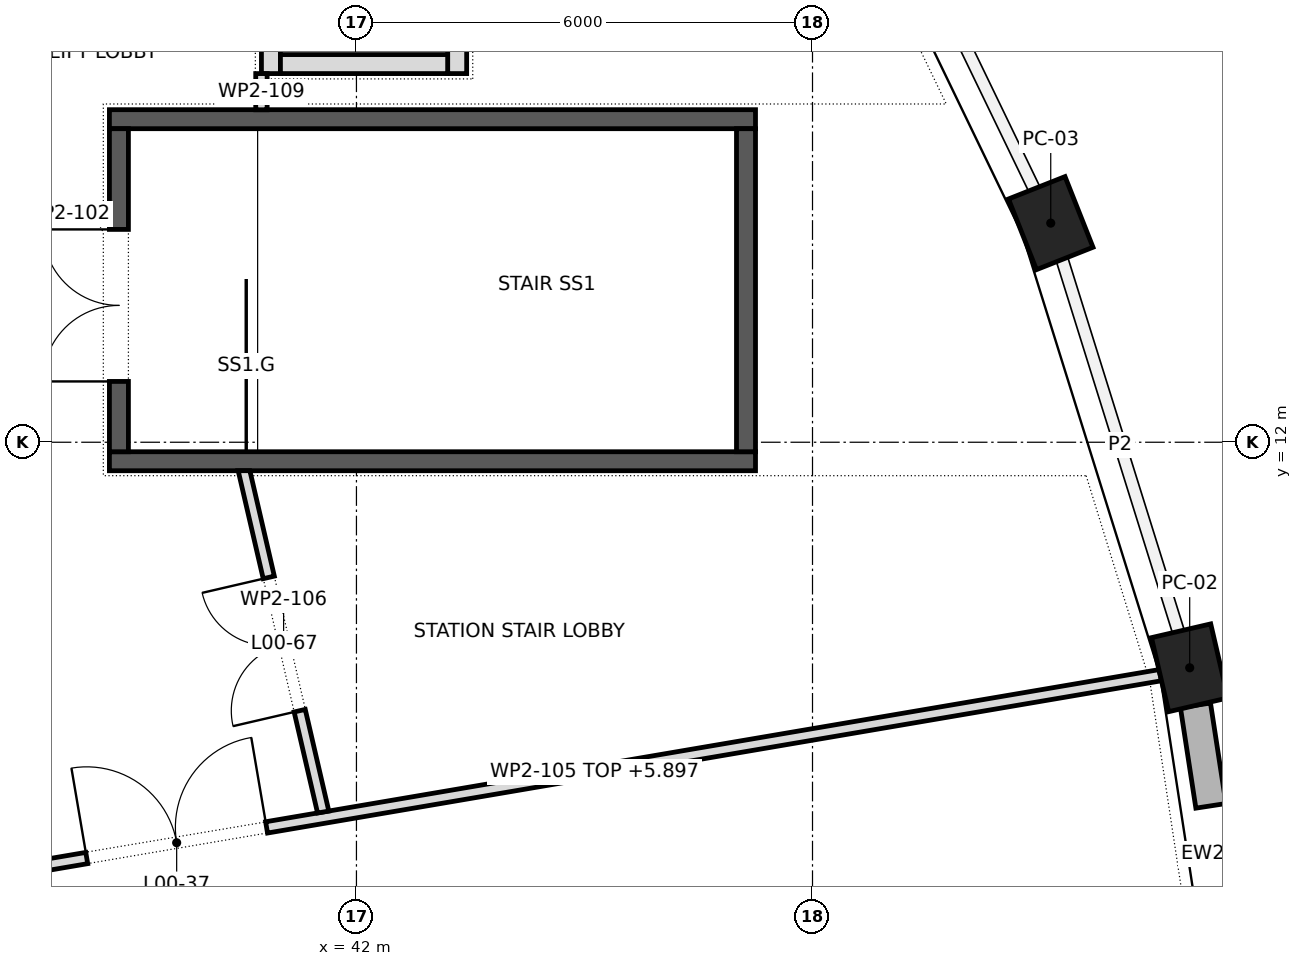
"""IFC4 building model, lengths in metres.
Left out: names, types, materials, properties, quantities, classifications, styles, units other than length and angle.
Written with IfcOpenShell. Run it as: python <this file> out.ifc"""

import sys

from ifc_helpers import new_model, si_unit, direction, frame, frame_2d, origin, origin_2d, place, context, subcontext, project, spatial, polyline, rectangle, outline, extrude, element, fill, save


model = new_model("IFC4")
c1 = context("Model", 3, precision=1e-05, world=origin(), true_north=direction((0.0, 1.0)))
c2 = subcontext(c1, "Body", "Model", "MODEL_VIEW")
j1 = project(units=[si_unit("LENGTHUNIT", "METRE"), si_unit("PLANEANGLEUNIT", "RADIAN")], contexts=[c1])
p1 = place(None, origin())
s1 = spatial("IfcSite", under=j1, at=p1, CompositionType="ELEMENT")
p2 = place(p1, origin())
s2 = spatial("IfcBuilding", under=s1, at=p2, CompositionType="ELEMENT")
p3 = place(p2, origin())
s3 = spatial("IfcBuildingStorey", under=s2, at=p3, CompositionType="ELEMENT", Elevation=0.0)
for number, where, z_axis, x_axis in (
    (1, (52.962, 9.033, 0.0), (0.0, 0.0, 1.0), (-0.226, 0.974, 0.0)),
    (2, (51.134, 14.883, 0.0), (0.0, 0.0, 1.0), (-0.368, 0.93, 0.0)),
):
    element("IfcColumn", number, at=place(p3, frame(where, z_axis=z_axis, x_axis=x_axis)), inside=s3, PredefinedType="COLUMN", context=c2, shape_type="SweptSolid", body=[
        extrude(rectangle(XDim=1.0, YDim=0.8, at=origin_2d()), origin(), (0.0, 0.0, 1.0), 7.0),
    ])
p4 = place(p3, frame((38.032, 2.267, 0.0), z_axis=(0.0, 0.0, 1.0), x_axis=(-0.226058185805, 0.974113800657, 0.0)))
e3 = element("IfcWall", 3, at=p4, inside=s3, PredefinedType="SHEAR", context=c2, shape_type="SweptSolid", body=[
    extrude(rectangle(XDim=8.329, YDim=1.2, at=frame_2d((4.165, 0.0))), origin(), (0.0, 0.0, 1.0), 7.0),
])
p5 = place(p3, frame((53.809, 3.522, 0.0), z_axis=(0.0, 0.0, 1.0), x_axis=(-0.151778822734, 0.988414482375, 0.0)))
e4 = element("IfcWall", 4, at=p5, inside=s3, PredefinedType="STANDARD", context=c2, shape_type="SweptSolid", body=[
    extrude(rectangle(XDim=5.075, YDim=0.4, at=frame_2d((2.538, 0.0))), origin(), (0.0, 0.0, 1.0), 6.2),
])
p6 = place(p5, frame((1.337, 0.0, 0.0)))
e5 = element("IfcOpeningElement", 5, at=p6, cuts=e4, PredefinedType="OPENING", context=c2, shape_type="SweptSolid", body=[
    extrude(rectangle(XDim=2.4, YDim=2.4, at=frame_2d((1.2, 1.2))), frame((0.0, 0.212, 0.0), z_axis=(0.0, -1.0, 0.0), x_axis=(1.0, 0.0, 0.0)), (0.0, 0.0, 1.0), 0.424),
])
for number, where, z_axis, x_axis in (
    (6, (38.75, 16.25, 0.0), (0.0, 0.0, 1.0), (1.0, 0.0, 0.0)),
    (7, (38.75, 11.75, 0.0), (0.0, 0.0, 1.0), (1.0, 0.0, 0.0)),
):
    element("IfcWall", number, at=place(p3, frame(where, z_axis=z_axis, x_axis=x_axis)), inside=s3, PredefinedType="SHEAR", context=c2, shape_type="SweptSolid", body=[
        extrude(rectangle(XDim=8.5, YDim=0.25, at=frame_2d((4.25, 0.0))), origin(), (0.0, 0.0, 1.0), 6.65),
    ])
p7 = place(p3, frame((38.875, 11.875, 0.0), z_axis=(0.0, 0.0, 1.0), x_axis=(0.0, 1.0, 0.0)))
e8 = element("IfcWall", 8, at=p7, inside=s3, PredefinedType="SHEAR", context=c2, shape_type="SweptSolid", body=[
    extrude(rectangle(XDim=4.25, YDim=0.25, at=frame_2d((2.125, 0.0))), origin(), (0.0, 0.0, 1.0), 6.65),
])
p8 = place(p7, frame((0.925, 0.0, 0.0)))
e9 = element("IfcOpeningElement", 9, at=p8, cuts=e8, PredefinedType="OPENING", context=c2, shape_type="SweptSolid", body=[
    extrude(rectangle(XDim=2.0, YDim=2.1, at=frame_2d((1.0, 1.05))), frame((0.0, 0.137, 0.0), z_axis=(0.0, -1.0, 0.0), x_axis=(1.0, 0.0, 0.0)), (0.0, 0.0, 1.0), 0.274),
])
p9 = place(p3, frame((47.125, 11.875, 0.0), z_axis=(0.0, 0.0, 1.0), x_axis=(0.0, 1.0, 0.0)))
e10 = element("IfcWall", 10, at=p9, inside=s3, PredefinedType="SHEAR", context=c2, shape_type="SweptSolid", body=[
    extrude(rectangle(XDim=4.25, YDim=0.25, at=frame_2d((2.125, 0.0))), origin(), (0.0, 0.0, 1.0), 6.65),
])
p10 = place(p3, frame((40.875, 16.85, 0.0), z_axis=(0.0, 0.0, 1.0), x_axis=(0.0, 1.0, 0.0)))
e11 = element("IfcWall", 11, at=p10, inside=s3, PredefinedType="PARTITIONING", context=c2, shape_type="SweptSolid", body=[
    extrude(rectangle(XDim=2.3, YDim=0.25, at=frame_2d((1.15, 0.0))), origin(), (0.0, 0.0, 1.0), 6.65),
])
p11 = place(p10, frame((0.6, 0.0, 0.0)))
e12 = element("IfcOpeningElement", 12, at=p11, cuts=e11, PredefinedType="OPENING", context=c2, shape_type="SweptSolid", body=[
    extrude(rectangle(XDim=1.1, YDim=2.1, at=frame_2d((0.55, 1.05))), frame((0.0, 0.137, 0.0), z_axis=(0.0, -1.0, 0.0), x_axis=(1.0, 0.0, 0.0)), (0.0, 0.0, 1.0), 0.274),
])
p12 = place(p3, frame((43.325, 16.85, 0.0), z_axis=(0.0, 0.0, 1.0), x_axis=(0.0, 1.0, 0.0)))
e13 = element("IfcWall", 13, at=p12, inside=s3, PredefinedType="PARTITIONING", context=c2, shape_type="SweptSolid", body=[
    extrude(rectangle(XDim=2.3, YDim=0.25, at=frame_2d((1.15, 0.0))), origin(), (0.0, 0.0, 1.0), 6.65),
])
p13 = place(p3, frame((41.0, 16.975, 0.0), z_axis=(0.0, 0.0, 1.0), x_axis=(1.0, 0.0, 0.0)))
e14 = element("IfcWall", 14, at=p13, inside=s3, PredefinedType="PARTITIONING", context=c2, shape_type="SweptSolid", body=[
    extrude(rectangle(XDim=2.2, YDim=0.25, at=frame_2d((1.1, 0.0))), origin(), (0.0, 0.0, 1.0), 6.65),
])
p14 = place(p3, frame((37.625, 15.0, 0.0), z_axis=(0.0, 0.0, 1.0), x_axis=(1.0, 0.0, 0.0)))
e15 = element("IfcWall", 15, at=p14, inside=s3, PredefinedType="PARTITIONING", context=c2, shape_type="SweptSolid", body=[
    extrude(rectangle(XDim=1.126, YDim=0.15, at=frame_2d((0.563, 0.0))), origin(), (0.0, 0.0, 1.0), 6.65),
])
p15 = place(p3, frame((37.688, 6.4, 0.0), z_axis=(0.0, 0.0, 1.0), x_axis=(0.985802614267, 0.167908325299, 0.0)))
e16 = element("IfcWall", 16, at=p15, inside=s3, PredefinedType="PARTITIONING", context=c2, shape_type="SweptSolid", body=[
    extrude(outline(polyline([(0.004, -0.075), (15.106, -0.075), (15.097, 0.075), (-0.004, 0.075), (0.004, -0.075)])), origin(), (0.0, 0.0, 1.0), 5.897),
])
p16 = place(p15, frame((0.775, 0.0, 0.0)))
e17 = element("IfcOpeningElement", 17, at=p16, cuts=e16, PredefinedType="OPENING", context=c2, shape_type="SweptSolid", body=[
    extrude(rectangle(XDim=2.4, YDim=2.1, at=frame_2d((1.2, 1.05))), frame((0.0, 0.087, 0.0), z_axis=(0.0, -1.0, 0.0), x_axis=(1.0, 0.0, 0.0)), (0.0, 0.0, 1.0), 0.174),
])
p17 = place(p3, frame((40.521, 11.625, 0.0), z_axis=(0.0, 0.0, 1.0), x_axis=(0.225938556647, -0.974141554714, 0.0)))
e18 = element("IfcWall", 18, at=p17, inside=s3, PredefinedType="PARTITIONING", context=c2, shape_type="SweptSolid", body=[
    extrude(outline(polyline([(-0.017, -0.075), (4.605, -0.075), (4.614, 0.075), (0.017, 0.075), (-0.017, -0.075)])), origin(), (0.0, 0.0, 1.0), 6.65),
])
p18 = place(p17, frame((1.441, 0.0, 0.0)))
e19 = element("IfcOpeningElement", 19, at=p18, cuts=e18, PredefinedType="OPENING", context=c2, shape_type="SweptSolid", body=[
    extrude(rectangle(XDim=1.8, YDim=2.1, at=frame_2d((0.9, 1.05))), frame((0.0, 0.087, 0.0), z_axis=(0.0, -1.0, 0.0), x_axis=(1.0, 0.0, 0.0)), (0.0, 0.0, 1.0), 0.174),
])
p19 = place(p3, frame((40.75, 16.85, 0.0), z_axis=(0.0, 0.0, 1.0), x_axis=(0.0, -1.0, 0.0)))
e20 = element("IfcWall", 20, at=p19, inside=s3, PredefinedType="PARTITIONING", context=c2, shape_type="SweptSolid", body=[
    extrude(rectangle(XDim=0.476, YDim=0.15, at=frame_2d((0.238, 0.0))), origin(), (0.0, 0.0, 1.0), 6.65),
])
p20 = place(p6, frame((2.4, 0.0, 0.0), z_axis=(0.0, 0.0, 1.0), x_axis=(-1.0, 0.0, 0.0)))
e21 = element("IfcDoor", 21, at=p20, inside=s3, OperationType="DOUBLE_DOOR_SINGLE_SWING", PredefinedType="DOOR", context=c2, shape_type="SweptSolid", body=[
    extrude(rectangle(XDim=2.4, YDim=2.4, at=frame_2d((1.2, 1.2))), frame((0.0, 0.025, 0.0), z_axis=(0.0, -1.0, 0.0), x_axis=(1.0, 0.0, 0.0)), (0.0, 0.0, 1.0), 0.05),
])
fill(e5, e21)
p21 = place(p8, origin())
e22 = element("IfcDoor", 22, at=p21, inside=s3, OperationType="DOUBLE_DOOR_SINGLE_SWING", PredefinedType="DOOR", context=c2, shape_type="SweptSolid", body=[
    extrude(rectangle(XDim=2.0, YDim=2.1, at=frame_2d((1.0, 1.05))), frame((0.0, 0.025, 0.0), z_axis=(0.0, -1.0, 0.0), x_axis=(1.0, 0.0, 0.0)), (0.0, 0.0, 1.0), 0.05),
])
fill(e9, e22)
p22 = place(p16, origin())
e23 = element("IfcDoor", 23, at=p22, inside=s3, OperationType="DOUBLE_DOOR_SINGLE_SWING", PredefinedType="DOOR", context=c2, shape_type="SweptSolid", body=[
    extrude(rectangle(XDim=2.4, YDim=2.1, at=frame_2d((1.2, 1.05))), frame((0.0, 0.025, 0.0), z_axis=(0.0, -1.0, 0.0), x_axis=(1.0, 0.0, 0.0)), (0.0, 0.0, 1.0), 0.05),
])
fill(e17, e23)
p23 = place(p18, frame((1.8, 0.0, 0.0), z_axis=(0.0, 0.0, 1.0), x_axis=(-1.0, 0.0, 0.0)))
e24 = element("IfcDoor", 24, at=p23, inside=s3, OperationType="DOUBLE_DOOR_SINGLE_SWING", PredefinedType="DOOR", context=c2, shape_type="SweptSolid", body=[
    extrude(rectangle(XDim=1.8, YDim=2.1, at=frame_2d((0.9, 1.05))), frame((0.0, 0.025, 0.0), z_axis=(0.0, -1.0, 0.0), x_axis=(1.0, 0.0, 0.0)), (0.0, 0.0, 1.0), 0.05),
])
fill(e19, e24)
save(model, sys.argv[1])
